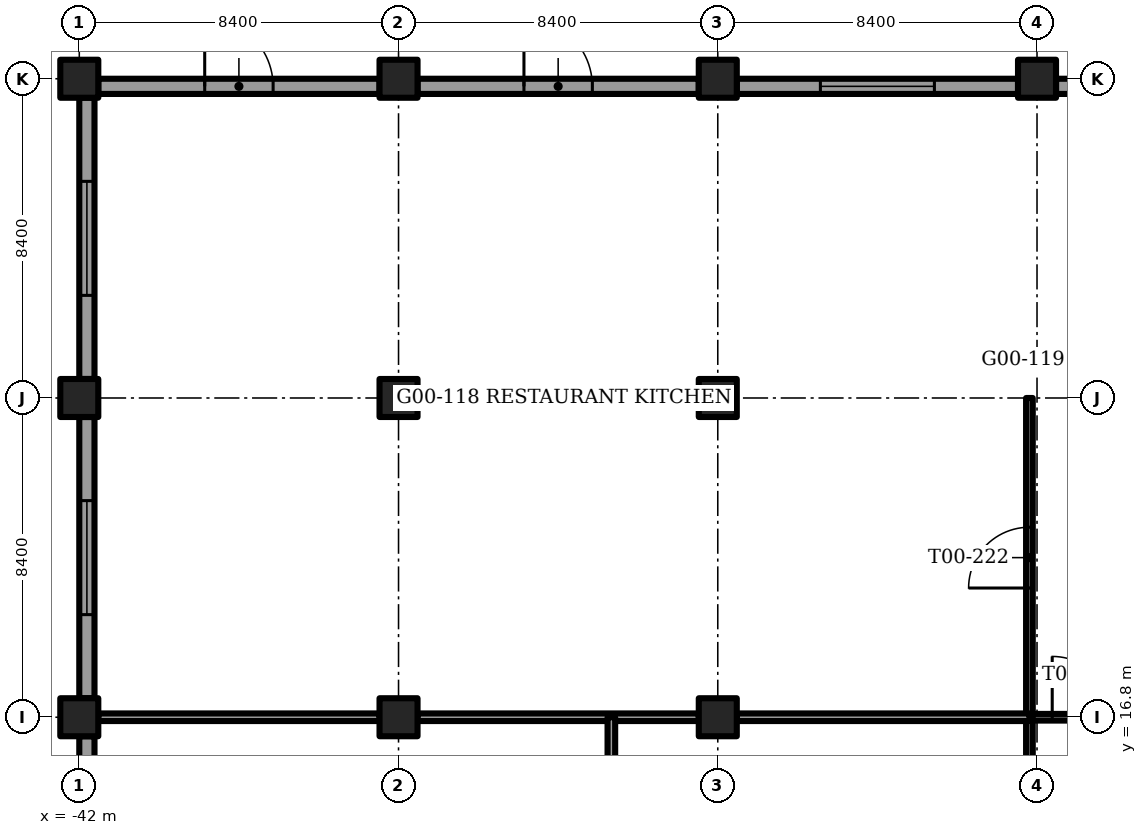
"""IFC4 building model, lengths in metres.
Left out: names, types, materials, properties, quantities, classifications, styles, units other than length and angle.
Written with IfcOpenShell. Run it as: python <this file> out.ifc"""

import sys

from ifc_helpers import new_model, si_unit, direction, frame, frame_2d, origin, origin_2d, place, context, subcontext, project, spatial, rectangle, extrude, element, fill, save


model = new_model("IFC4")
c1 = context("Model", 3, precision=1e-05, world=origin(), true_north=direction((0.0, 1.0)))
c2 = subcontext(c1, "Body", "Model", "MODEL_VIEW")
j1 = project(units=[si_unit("LENGTHUNIT", "METRE"), si_unit("PLANEANGLEUNIT", "RADIAN")], contexts=[c1])
p1 = place(None, origin())
s1 = spatial("IfcSite", under=j1, at=p1, CompositionType="ELEMENT")
p2 = place(p1, origin())
s2 = spatial("IfcBuilding", under=s1, at=p2, CompositionType="ELEMENT")
p3 = place(p2, origin())
s3 = spatial("IfcBuildingStorey", under=s2, at=p3, CompositionType="ELEMENT", Elevation=0.0)
for number, where, z_axis, x_axis in (
    (1, (-42.0, 16.8, -0.35), (0.0, 0.0, 1.0), (1.0, 0.0, 0.0)),
    (2, (-42.0, 25.2, -0.35), (0.0, 0.0, 1.0), (1.0, 0.0, 0.0)),
    (3, (-42.0, 33.6, -0.35), (0.0, 0.0, 1.0), (1.0, 0.0, 0.0)),
    (4, (-33.6, 16.8, -0.35), (0.0, 0.0, 1.0), (1.0, 0.0, 0.0)),
    (5, (-33.6, 25.2, -0.35), (0.0, 0.0, 1.0), (1.0, 0.0, 0.0)),
    (6, (-33.6, 33.6, -0.35), (0.0, 0.0, 1.0), (1.0, 0.0, 0.0)),
    (7, (-25.2, 16.8, -0.35), (0.0, 0.0, 1.0), (1.0, 0.0, 0.0)),
    (8, (-25.2, 25.2, -0.35), (0.0, 0.0, 1.0), (1.0, 0.0, 0.0)),
    (9, (-25.2, 33.6, -0.35), (0.0, 0.0, 1.0), (1.0, 0.0, 0.0)),
    (10, (-16.8, 33.6, -0.35), (0.0, 0.0, 1.0), (1.0, 0.0, 0.0)),
):
    element("IfcColumn", number, at=place(p3, frame(where, z_axis=z_axis, x_axis=x_axis)), inside=s3, PredefinedType="COLUMN", context=c2, shape_type="SweptSolid", body=[
        extrude(rectangle(XDim=1.0, YDim=1.0, at=origin_2d()), origin(), (0.0, 0.0, 1.0), 6.0),
    ])
p4 = place(p3, frame((-41.5, 33.4, 0.0), z_axis=(0.0, 0.0, 1.0), x_axis=(1.0, 0.0, 0.0)))
e11 = element("IfcWall", 11, at=p4, inside=s3, PredefinedType="SOLIDWALL", context=c2, shape_type="SweptSolid", body=[
    extrude(rectangle(XDim=7.4, YDim=0.4, at=frame_2d((3.7, 0.0))), origin(), (0.0, 0.0, 1.0), 5.65),
])
p5 = place(p4, frame((2.8, 0.0, 0.0)))
e12 = element("IfcOpeningElement", 12, at=p5, cuts=e11, PredefinedType="OPENING", context=c2, shape_type="SweptSolid", body=[
    extrude(rectangle(XDim=1.8, YDim=2.4, at=frame_2d((0.9, 1.2))), frame((0.0, 0.2, 0.0), z_axis=(0.0, -1.0, 0.0), x_axis=(1.0, 0.0, 0.0)), (0.0, 0.0, 1.0), 0.4),
])
p6 = place(p3, frame((-33.1, 33.4, 0.0), z_axis=(0.0, 0.0, 1.0), x_axis=(1.0, 0.0, 0.0)))
e13 = element("IfcWall", 13, at=p6, inside=s3, PredefinedType="SOLIDWALL", context=c2, shape_type="SweptSolid", body=[
    extrude(rectangle(XDim=7.4, YDim=0.4, at=frame_2d((3.7, 0.0))), origin(), (0.0, 0.0, 1.0), 5.65),
])
p7 = place(p6, frame((2.8, 0.0, 0.0)))
e14 = element("IfcOpeningElement", 14, at=p7, cuts=e13, PredefinedType="OPENING", context=c2, shape_type="SweptSolid", body=[
    extrude(rectangle(XDim=1.8, YDim=2.4, at=frame_2d((0.9, 1.2))), frame((0.0, 0.2, 0.0), z_axis=(0.0, -1.0, 0.0), x_axis=(1.0, 0.0, 0.0)), (0.0, 0.0, 1.0), 0.4),
])
p8 = place(p3, frame((-24.7, 33.4, 0.0), z_axis=(0.0, 0.0, 1.0), x_axis=(1.0, 0.0, 0.0)))
e15 = element("IfcWall", 15, at=p8, inside=s3, PredefinedType="SOLIDWALL", context=c2, shape_type="SweptSolid", body=[
    extrude(rectangle(XDim=7.4, YDim=0.4, at=frame_2d((3.7, 0.0))), origin(), (0.0, 0.0, 1.0), 5.65),
])
p9 = place(p8, frame((2.2, 0.0, 1.0)))
e16 = element("IfcOpeningElement", 16, at=p9, cuts=e15, PredefinedType="OPENING", context=c2, shape_type="SweptSolid", body=[
    extrude(rectangle(XDim=3.0, YDim=2.2, at=frame_2d((1.5, 1.1))), frame((0.0, 0.2, 0.0), z_axis=(0.0, -1.0, 0.0), x_axis=(1.0, 0.0, 0.0)), (0.0, 0.0, 1.0), 0.4),
])
p10 = place(p3, frame((-16.3, 33.4, 0.0), z_axis=(0.0, 0.0, 1.0), x_axis=(1.0, 0.0, 0.0)))
e17 = element("IfcWall", 17, at=p10, inside=s3, PredefinedType="SOLIDWALL", context=c2, shape_type="SweptSolid", body=[
    extrude(rectangle(XDim=7.4, YDim=0.4, at=frame_2d((3.7, 0.0))), origin(), (0.0, 0.0, 1.0), 5.65),
])
p11 = place(p10, frame((2.8, 0.0, 0.0)))
e18 = element("IfcOpeningElement", 18, at=p11, cuts=e17, PredefinedType="OPENING", context=c2, shape_type="SweptSolid", body=[
    extrude(rectangle(XDim=1.8, YDim=2.4, at=frame_2d((0.9, 1.2))), frame((0.0, 0.2, 0.0), z_axis=(0.0, -1.0, 0.0), x_axis=(1.0, 0.0, 0.0)), (0.0, 0.0, 1.0), 0.4),
])
p12 = place(p3, frame((-41.8, 8.9, 0.0), z_axis=(0.0, 0.0, 1.0), x_axis=(0.0, 1.0, 0.0)))
e19 = element("IfcWall", 19, at=p12, inside=s3, PredefinedType="SOLIDWALL", context=c2, shape_type="SweptSolid", body=[
    extrude(rectangle(XDim=7.4, YDim=0.4, at=frame_2d((3.7, 0.0))), origin(), (0.0, 0.0, 1.0), 5.65),
])
p13 = place(p12, frame((2.2, 0.0, 1.0)))
e20 = element("IfcOpeningElement", 20, at=p13, cuts=e19, PredefinedType="OPENING", context=c2, shape_type="SweptSolid", body=[
    extrude(rectangle(XDim=3.0, YDim=2.2, at=frame_2d((1.5, 1.1))), frame((0.0, 0.2, 0.0), z_axis=(0.0, -1.0, 0.0), x_axis=(1.0, 0.0, 0.0)), (0.0, 0.0, 1.0), 0.4),
])
p14 = place(p3, frame((-41.8, 17.3, 0.0), z_axis=(0.0, 0.0, 1.0), x_axis=(0.0, 1.0, 0.0)))
e21 = element("IfcWall", 21, at=p14, inside=s3, PredefinedType="SOLIDWALL", context=c2, shape_type="SweptSolid", body=[
    extrude(rectangle(XDim=7.4, YDim=0.4, at=frame_2d((3.7, 0.0))), origin(), (0.0, 0.0, 1.0), 5.65),
])
p15 = place(p14, frame((2.2, 0.0, 1.0)))
e22 = element("IfcOpeningElement", 22, at=p15, cuts=e21, PredefinedType="OPENING", context=c2, shape_type="SweptSolid", body=[
    extrude(rectangle(XDim=3.0, YDim=2.2, at=frame_2d((1.5, 1.1))), frame((0.0, 0.2, 0.0), z_axis=(0.0, -1.0, 0.0), x_axis=(1.0, 0.0, 0.0)), (0.0, 0.0, 1.0), 0.4),
])
p16 = place(p3, frame((-41.8, 25.7, 0.0), z_axis=(0.0, 0.0, 1.0), x_axis=(0.0, 1.0, 0.0)))
e23 = element("IfcWall", 23, at=p16, inside=s3, PredefinedType="SOLIDWALL", context=c2, shape_type="SweptSolid", body=[
    extrude(rectangle(XDim=7.4, YDim=0.4, at=frame_2d((3.7, 0.0))), origin(), (0.0, 0.0, 1.0), 5.65),
])
p17 = place(p16, frame((2.2, 0.0, 1.0)))
e24 = element("IfcOpeningElement", 24, at=p17, cuts=e23, PredefinedType="OPENING", context=c2, shape_type="SweptSolid", body=[
    extrude(rectangle(XDim=3.0, YDim=2.2, at=frame_2d((1.5, 1.1))), frame((0.0, 0.2, 0.0), z_axis=(0.0, -1.0, 0.0), x_axis=(1.0, 0.0, 0.0)), (0.0, 0.0, 1.0), 0.4),
])
p18 = place(p3, frame((-17.0, 16.8, 0.0), z_axis=(0.0, 0.0, 1.0), x_axis=(1.0, 0.0, 0.0)))
e25 = element("IfcWall", 25, at=p18, inside=s3, PredefinedType="PARTITIONING", context=c2, shape_type="SweptSolid", body=[
    extrude(rectangle(XDim=2.8, YDim=0.175, at=frame_2d((1.4, 0.0))), origin(), (0.0, 0.0, 1.0), 4.8),
])
p19 = place(p18, frame((0.6, 0.0, 0.0)))
e26 = element("IfcOpeningElement", 26, at=p19, cuts=e25, PredefinedType="OPENING", context=c2, shape_type="SweptSolid", body=[
    extrude(rectangle(XDim=1.6, YDim=2.1, at=frame_2d((0.8, 1.05))), frame((0.0, 0.087, 0.0), z_axis=(0.0, -1.0, 0.0), x_axis=(1.0, 0.0, 0.0)), (0.0, 0.0, 1.0), 0.175),
])
p20 = place(p3, frame((-17.0, -21.0, 0.0), z_axis=(0.0, 0.0, 1.0), x_axis=(0.0, 1.0, 0.0)))
e27 = element("IfcWall", 27, at=p20, inside=s3, PredefinedType="PARTITIONING", context=c2, shape_type="SweptSolid", body=[
    extrude(rectangle(XDim=46.2, YDim=0.175, at=frame_2d((23.1, 0.0))), origin(), (0.0, 0.0, 1.0), 4.8),
])
p21 = place(p20, frame((15.996, 0.0, 0.0)))
e28 = element("IfcOpeningElement", 28, at=p21, cuts=e27, PredefinedType="OPENING", context=c2, shape_type="SweptSolid", body=[
    extrude(rectangle(XDim=1.6, YDim=2.1, at=frame_2d((0.8, 1.05))), frame((0.0, 0.087, 0.0), z_axis=(0.0, -1.0, 0.0), x_axis=(1.0, 0.0, 0.0)), (0.0, 0.0, 1.0), 0.175),
])
p22 = place(p20, frame((28.404, 0.0, 0.0)))
e29 = element("IfcOpeningElement", 29, at=p22, cuts=e27, PredefinedType="OPENING", context=c2, shape_type="SweptSolid", body=[
    extrude(rectangle(XDim=1.6, YDim=2.1, at=frame_2d((0.8, 1.05))), frame((0.0, 0.087, 0.0), z_axis=(0.0, -1.0, 0.0), x_axis=(1.0, 0.0, 0.0)), (0.0, 0.0, 1.0), 0.175),
])
p23 = place(p20, frame((41.2, 0.0, 0.0)))
e30 = element("IfcOpeningElement", 30, at=p23, cuts=e27, PredefinedType="OPENING", context=c2, shape_type="SweptSolid", body=[
    extrude(rectangle(XDim=1.6, YDim=2.1, at=frame_2d((0.8, 1.05))), frame((0.0, 0.087, 0.0), z_axis=(0.0, -1.0, 0.0), x_axis=(1.0, 0.0, 0.0)), (0.0, 0.0, 1.0), 0.175),
])
p24 = place(p3, frame((-41.5, 16.8, 0.0), z_axis=(0.0, 0.0, 1.0), x_axis=(1.0, 0.0, 0.0)))
e31 = element("IfcWall", 31, at=p24, inside=s3, PredefinedType="PARTITIONING", context=c2, shape_type="SweptSolid", body=[
    extrude(rectangle(XDim=7.4, YDim=0.2, at=frame_2d((3.7, 0.0))), origin(), (0.0, 0.0, 1.0), 5.65),
])
p25 = place(p3, frame((-33.1, 16.8, 0.0), z_axis=(0.0, 0.0, 1.0), x_axis=(1.0, 0.0, 0.0)))
e32 = element("IfcWall", 32, at=p25, inside=s3, PredefinedType="PARTITIONING", context=c2, shape_type="SweptSolid", body=[
    extrude(rectangle(XDim=7.4, YDim=0.2, at=frame_2d((3.7, 0.0))), origin(), (0.0, 0.0, 1.0), 5.65),
])
p26 = place(p3, frame((-24.7, 16.8, 0.0), z_axis=(0.0, 0.0, 1.0), x_axis=(1.0, 0.0, 0.0)))
e33 = element("IfcWall", 33, at=p26, inside=s3, PredefinedType="PARTITIONING", context=c2, shape_type="SweptSolid", body=[
    extrude(rectangle(XDim=7.7, YDim=0.2, at=frame_2d((3.85, 0.0))), origin(), (0.0, 0.0, 1.0), 5.65),
])
p27 = place(p3, frame((-28.0, 4.0, 0.0), z_axis=(0.0, 0.0, 1.0), x_axis=(0.0, 1.0, 0.0)))
e34 = element("IfcWall", 34, at=p27, inside=s3, PredefinedType="PARTITIONING", context=c2, shape_type="SweptSolid", body=[
    extrude(rectangle(XDim=12.8, YDim=0.2, at=frame_2d((6.4, 0.0))), origin(), (0.0, 0.0, 1.0), 5.65),
])
p28 = place(p5, origin())
e35 = element("IfcDoor", 35, at=p28, inside=s3, OperationType="SINGLE_SWING_LEFT", PredefinedType="DOOR", context=c2, shape_type="SweptSolid", body=[
    extrude(rectangle(XDim=1.8, YDim=2.4, at=frame_2d((0.9, 1.2))), frame((0.0, 0.025, 0.0), z_axis=(0.0, -1.0, 0.0), x_axis=(1.0, 0.0, 0.0)), (0.0, 0.0, 1.0), 0.05),
])
fill(e12, e35)
p29 = place(p7, origin())
e36 = element("IfcDoor", 36, at=p29, inside=s3, OperationType="SINGLE_SWING_LEFT", PredefinedType="DOOR", context=c2, shape_type="SweptSolid", body=[
    extrude(rectangle(XDim=1.8, YDim=2.4, at=frame_2d((0.9, 1.2))), frame((0.0, 0.025, 0.0), z_axis=(0.0, -1.0, 0.0), x_axis=(1.0, 0.0, 0.0)), (0.0, 0.0, 1.0), 0.05),
])
fill(e14, e36)
p30 = place(p9, origin())
e37 = element("IfcWindow", 37, at=p30, inside=s3, PartitioningType="SINGLE_PANEL", PredefinedType="WINDOW", context=c2, shape_type="SweptSolid", body=[
    extrude(rectangle(XDim=3.0, YDim=2.2, at=frame_2d((1.5, 1.1))), frame((0.0, 0.03, 0.0), z_axis=(0.0, -1.0, 0.0), x_axis=(1.0, 0.0, 0.0)), (0.0, 0.0, 1.0), 0.06),
])
fill(e16, e37)
p31 = place(p15, origin())
e38 = element("IfcWindow", 38, at=p31, inside=s3, PartitioningType="SINGLE_PANEL", PredefinedType="WINDOW", context=c2, shape_type="SweptSolid", body=[
    extrude(rectangle(XDim=3.0, YDim=2.2, at=frame_2d((1.5, 1.1))), frame((0.0, 0.03, 0.0), z_axis=(0.0, -1.0, 0.0), x_axis=(1.0, 0.0, 0.0)), (0.0, 0.0, 1.0), 0.06),
])
fill(e22, e38)
p32 = place(p17, origin())
e39 = element("IfcWindow", 39, at=p32, inside=s3, PartitioningType="SINGLE_PANEL", PredefinedType="WINDOW", context=c2, shape_type="SweptSolid", body=[
    extrude(rectangle(XDim=3.0, YDim=2.2, at=frame_2d((1.5, 1.1))), frame((0.0, 0.03, 0.0), z_axis=(0.0, -1.0, 0.0), x_axis=(1.0, 0.0, 0.0)), (0.0, 0.0, 1.0), 0.06),
])
fill(e24, e39)
p33 = place(p19, origin())
e40 = element("IfcDoor", 40, at=p33, inside=s3, OperationType="DOUBLE_DOOR_SINGLE_SWING", PredefinedType="DOOR", context=c2, shape_type="SweptSolid", body=[
    extrude(rectangle(XDim=1.6, YDim=2.1, at=frame_2d((0.8, 1.05))), frame((0.0, 0.025, 0.0), z_axis=(0.0, -1.0, 0.0), x_axis=(1.0, 0.0, 0.0)), (0.0, 0.0, 1.0), 0.05),
])
fill(e26, e40)
p34 = place(p23, origin())
e41 = element("IfcDoor", 41, at=p34, inside=s3, OperationType="DOUBLE_DOOR_SINGLE_SWING", PredefinedType="DOOR", context=c2, shape_type="SweptSolid", body=[
    extrude(rectangle(XDim=1.6, YDim=2.1, at=frame_2d((0.8, 1.05))), frame((0.0, 0.025, 0.0), z_axis=(0.0, -1.0, 0.0), x_axis=(1.0, 0.0, 0.0)), (0.0, 0.0, 1.0), 0.05),
])
fill(e30, e41)
save(model, sys.argv[1])
